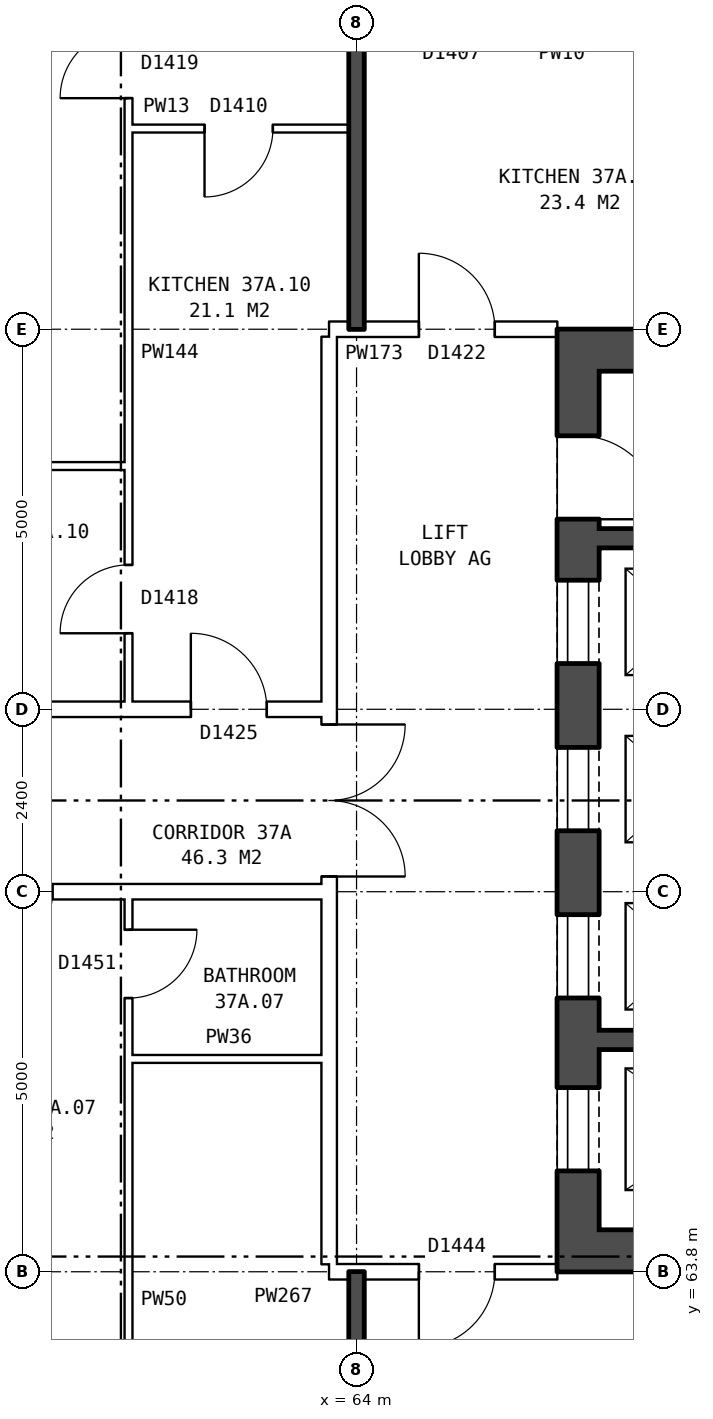
"""IFC4 building model, lengths in metres.
Left out: names, types, materials, properties, quantities, classifications, styles, units other than length and angle.
Written with IfcOpenShell. Run it as: python <this file> out.ifc"""

import sys

from ifc_helpers import new_model, si_unit, direction, frame, frame_2d, origin, place, context, subcontext, project, spatial, rectangle, extrude, element, fill, save


model = new_model("IFC4")
c1 = context("Model", 3, precision=1e-05, world=origin(), true_north=direction((0.0, 1.0)))
c2 = subcontext(c1, "Body", "Model", "MODEL_VIEW")
j1 = project(units=[si_unit("LENGTHUNIT", "METRE"), si_unit("PLANEANGLEUNIT", "RADIAN")], contexts=[c1])
p1 = place(None, origin())
s1 = spatial("IfcSite", under=j1, at=p1, CompositionType="ELEMENT")
p2 = place(p1, origin())
s2 = spatial("IfcBuilding", under=s1, at=p2, CompositionType="ELEMENT")
p3 = place(p2, frame((0.0, 0.0, 133.0)))
s3 = spatial("IfcBuildingStorey", under=s2, at=p3, CompositionType="ELEMENT", Elevation=133.0)
p4 = place(p3, frame((66.915, 63.8, 0.0), z_axis=(0.0, 0.0, 1.0), x_axis=(0.0, 1.0, 0.0)))
e1 = element("IfcWall", 1, at=p4, inside=s3, PredefinedType="SHEAR", context=c2, shape_type="SweptSolid", body=[
    extrude(rectangle(XDim=12.4, YDim=0.55, at=frame_2d((6.2, 0.0))), origin(), (0.0, 0.0, 1.0), 2.85),
])
p5 = place(p4, frame((1.325, 0.0, 0.0)))
e2 = element("IfcOpeningElement", 2, at=p5, cuts=e1, PredefinedType="OPENING", context=c2, shape_type="SweptSolid", body=[
    extrude(rectangle(XDim=1.1, YDim=2.1, at=frame_2d((0.55, 1.05))), frame((0.0, 0.285, 0.0), z_axis=(0.0, -1.0, 0.0), x_axis=(1.0, 0.0, 0.0)), (0.0, 0.0, 1.0), 0.57),
])
p6 = place(p4, frame((3.6, 0.0, 0.0)))
e3 = element("IfcOpeningElement", 3, at=p6, cuts=e1, PredefinedType="OPENING", context=c2, shape_type="SweptSolid", body=[
    extrude(rectangle(XDim=1.1, YDim=2.1, at=frame_2d((0.55, 1.05))), frame((0.0, 0.285, 0.0), z_axis=(0.0, -1.0, 0.0), x_axis=(1.0, 0.0, 0.0)), (0.0, 0.0, 1.0), 0.57),
])
p7 = place(p4, frame((5.8, 0.0, 0.0)))
e4 = element("IfcOpeningElement", 4, at=p7, cuts=e1, PredefinedType="OPENING", context=c2, shape_type="SweptSolid", body=[
    extrude(rectangle(XDim=1.1, YDim=2.1, at=frame_2d((0.55, 1.05))), frame((0.0, 0.285, 0.0), z_axis=(0.0, -1.0, 0.0), x_axis=(1.0, 0.0, 0.0)), (0.0, 0.0, 1.0), 0.57),
])
p8 = place(p4, frame((8.0, 0.0, 0.0)))
e5 = element("IfcOpeningElement", 5, at=p8, cuts=e1, PredefinedType="OPENING", context=c2, shape_type="SweptSolid", body=[
    extrude(rectangle(XDim=1.1, YDim=2.1, at=frame_2d((0.55, 1.05))), frame((0.0, 0.285, 0.0), z_axis=(0.0, -1.0, 0.0), x_axis=(1.0, 0.0, 0.0)), (0.0, 0.0, 1.0), 0.57),
])
p9 = place(p4, frame((9.9, 0.0, 0.0)))
e6 = element("IfcOpeningElement", 6, at=p9, cuts=e1, PredefinedType="OPENING", context=c2, shape_type="SweptSolid", body=[
    extrude(rectangle(XDim=1.1, YDim=2.1, at=frame_2d((0.55, 1.05))), frame((0.0, 0.285, 0.0), z_axis=(0.0, -1.0, 0.0), x_axis=(1.0, 0.0, 0.0)), (0.0, 0.0, 1.0), 0.57),
])
for number, where, z_axis, x_axis in (
    (7, (67.19, 64.075, 0.0), (0.0, 0.0, 1.0), (1.0, 0.0, 0.0)),
    (8, (67.19, 75.925, 0.0), (0.0, 0.0, 1.0), (1.0, 0.0, 0.0)),
):
    element("IfcWall", number, at=place(p3, frame(where, z_axis=z_axis, x_axis=x_axis)), inside=s3, PredefinedType="SHEAR", context=c2, shape_type="SweptSolid", body=[
        extrude(rectangle(XDim=7.9, YDim=0.55, at=frame_2d((3.95, 0.0))), origin(), (0.0, 0.0, 1.0), 2.85),
    ])
p10 = place(p3, frame((67.19, 66.85, 0.0), z_axis=(0.0, 0.0, 1.0), x_axis=(1.0, 0.0, 0.0)))
e9 = element("IfcWall", 9, at=p10, inside=s3, PredefinedType="SHEAR", context=c2, shape_type="SweptSolid", body=[
    extrude(rectangle(XDim=3.445, YDim=0.25, at=frame_2d((1.723, 0.0))), origin(), (0.0, 0.0, 1.0), 2.85),
])
p11 = place(p3, frame((67.19, 73.45, 0.0), z_axis=(0.0, 0.0, 1.0), x_axis=(1.0, 0.0, 0.0)))
e10 = element("IfcWall", 10, at=p11, inside=s3, PredefinedType="SHEAR", context=c2, shape_type="SweptSolid", body=[
    extrude(rectangle(XDim=2.375, YDim=0.25, at=frame_2d((1.188, 0.0))), origin(), (0.0, 0.0, 1.0), 2.85),
])
p12 = place(p3, frame((63.64, 63.9, 0.0), z_axis=(0.0, 0.0, 1.0), x_axis=(0.0, 1.0, 0.0)))
e11 = element("IfcWall", 11, at=p12, inside=s3, PredefinedType="PARTITIONING", context=c2, shape_type="SweptSolid", body=[
    extrude(rectangle(XDim=12.2, YDim=0.2, at=frame_2d((6.1, 0.0))), origin(), (0.0, 0.0, 1.0), 2.85),
])
p13 = place(p12, frame((5.1, 0.0, 0.0)))
e12 = element("IfcOpeningElement", 12, at=p13, cuts=e11, PredefinedType="OPENING", context=c2, shape_type="SweptSolid", body=[
    extrude(rectangle(XDim=2.0, YDim=2.1, at=frame_2d((1.0, 1.05))), frame((0.0, 0.11, 0.0), z_axis=(0.0, -1.0, 0.0), x_axis=(1.0, 0.0, 0.0)), (0.0, 0.0, 1.0), 0.22),
])
p14 = place(p3, frame((63.64, 63.8, 0.0), z_axis=(0.0, 0.0, 1.0), x_axis=(1.0, 0.0, 0.0)))
e13 = element("IfcWall", 13, at=p14, inside=s3, PredefinedType="PARTITIONING", context=c2, shape_type="SweptSolid", body=[
    extrude(rectangle(XDim=3.0, YDim=0.2, at=frame_2d((1.5, 0.0))), origin(), (0.0, 0.0, 1.0), 2.85),
])
p15 = place(p14, frame((1.18, 0.0, 0.0)))
e14 = element("IfcOpeningElement", 14, at=p15, cuts=e13, PredefinedType="OPENING", context=c2, shape_type="SweptSolid", body=[
    extrude(rectangle(XDim=1.0, YDim=2.1, at=frame_2d((0.5, 1.05))), frame((0.0, 0.11, 0.0), z_axis=(0.0, -1.0, 0.0), x_axis=(1.0, 0.0, 0.0)), (0.0, 0.0, 1.0), 0.22),
])
p16 = place(p3, frame((61.0, 66.6, 0.0), z_axis=(0.0, 0.0, 1.0), x_axis=(1.0, 0.0, 0.0)))
e15 = element("IfcWall", 15, at=p16, inside=s3, PredefinedType="PARTITIONING", context=c2, shape_type="SweptSolid", body=[
    extrude(rectangle(XDim=2.64, YDim=0.1, at=frame_2d((1.32, 0.0))), origin(), (0.0, 0.0, 1.0), 2.85),
])
p17 = place(p3, frame((44.36, 68.8, 0.0), z_axis=(0.0, 0.0, 1.0), x_axis=(1.0, 0.0, 0.0)))
e16 = element("IfcWall", 16, at=p17, inside=s3, PredefinedType="PARTITIONING", context=c2, shape_type="SweptSolid", body=[
    extrude(rectangle(XDim=19.28, YDim=0.2, at=frame_2d((9.64, 0.0))), origin(), (0.0, 0.0, 1.0), 2.85),
])
p18 = place(p17, frame((14.64, 0.0, 0.0)))
e17 = element("IfcOpeningElement", 17, at=p18, cuts=e16, PredefinedType="OPENING", context=c2, shape_type="SweptSolid", body=[
    extrude(rectangle(XDim=1.0, YDim=2.1, at=frame_2d((0.5, 1.05))), frame((0.0, 0.11, 0.0), z_axis=(0.0, -1.0, 0.0), x_axis=(1.0, 0.0, 0.0)), (0.0, 0.0, 1.0), 0.22),
])
p19 = place(p17, frame((8.64, 0.0, 0.0)))
e18 = element("IfcOpeningElement", 18, at=p19, cuts=e16, PredefinedType="OPENING", context=c2, shape_type="SweptSolid", body=[
    extrude(rectangle(XDim=1.0, YDim=2.1, at=frame_2d((0.5, 1.05))), frame((0.0, 0.11, 0.0), z_axis=(0.0, -1.0, 0.0), x_axis=(1.0, 0.0, 0.0)), (0.0, 0.0, 1.0), 0.22),
])
p20 = place(p17, frame((2.64, 0.0, 0.0)))
e19 = element("IfcOpeningElement", 19, at=p20, cuts=e16, PredefinedType="OPENING", context=c2, shape_type="SweptSolid", body=[
    extrude(rectangle(XDim=1.0, YDim=2.1, at=frame_2d((0.5, 1.05))), frame((0.0, 0.11, 0.0), z_axis=(0.0, -1.0, 0.0), x_axis=(1.0, 0.0, 0.0)), (0.0, 0.0, 1.0), 0.22),
])
p21 = place(p3, frame((44.36, 71.2, 0.0), z_axis=(0.0, 0.0, 1.0), x_axis=(1.0, 0.0, 0.0)))
e20 = element("IfcWall", 20, at=p21, inside=s3, PredefinedType="PARTITIONING", context=c2, shape_type="SweptSolid", body=[
    extrude(rectangle(XDim=19.28, YDim=0.2, at=frame_2d((9.64, 0.0))), origin(), (0.0, 0.0, 1.0), 2.85),
])
p22 = place(p21, frame((17.46, 0.0, 0.0)))
e21 = element("IfcOpeningElement", 21, at=p22, cuts=e20, PredefinedType="OPENING", context=c2, shape_type="SweptSolid", body=[
    extrude(rectangle(XDim=1.0, YDim=2.1, at=frame_2d((0.5, 1.05))), frame((0.0, 0.11, 0.0), z_axis=(0.0, -1.0, 0.0), x_axis=(1.0, 0.0, 0.0)), (0.0, 0.0, 1.0), 0.22),
])
p23 = place(p21, frame((8.64, 0.0, 0.0)))
e22 = element("IfcOpeningElement", 22, at=p23, cuts=e20, PredefinedType="OPENING", context=c2, shape_type="SweptSolid", body=[
    extrude(rectangle(XDim=1.0, YDim=2.1, at=frame_2d((0.5, 1.05))), frame((0.0, 0.11, 0.0), z_axis=(0.0, -1.0, 0.0), x_axis=(1.0, 0.0, 0.0)), (0.0, 0.0, 1.0), 0.22),
])
p24 = place(p21, frame((2.64, 0.0, 0.0)))
e23 = element("IfcOpeningElement", 23, at=p24, cuts=e20, PredefinedType="OPENING", context=c2, shape_type="SweptSolid", body=[
    extrude(rectangle(XDim=1.0, YDim=2.1, at=frame_2d((0.5, 1.05))), frame((0.0, 0.11, 0.0), z_axis=(0.0, -1.0, 0.0), x_axis=(1.0, 0.0, 0.0)), (0.0, 0.0, 1.0), 0.22),
])
p25 = place(p3, frame((58.1, 74.4, 0.0), z_axis=(0.0, 0.0, 1.0), x_axis=(1.0, 0.0, 0.0)))
e24 = element("IfcWall", 24, at=p25, inside=s3, PredefinedType="PARTITIONING", context=c2, shape_type="SweptSolid", body=[
    extrude(rectangle(XDim=2.9, YDim=0.1, at=frame_2d((1.45, 0.0))), origin(), (0.0, 0.0, 1.0), 2.85),
])
p26 = place(p3, frame((63.64, 76.2, 0.0), z_axis=(0.0, 0.0, 1.0), x_axis=(1.0, 0.0, 0.0)))
e25 = element("IfcWall", 25, at=p26, inside=s3, PredefinedType="PARTITIONING", context=c2, shape_type="SweptSolid", body=[
    extrude(rectangle(XDim=3.0, YDim=0.2, at=frame_2d((1.5, 0.0))), origin(), (0.0, 0.0, 1.0), 2.85),
])
p27 = place(p26, frame((1.18, 0.0, 0.0)))
e26 = element("IfcOpeningElement", 26, at=p27, cuts=e25, PredefinedType="OPENING", context=c2, shape_type="SweptSolid", body=[
    extrude(rectangle(XDim=1.0, YDim=2.1, at=frame_2d((0.5, 1.05))), frame((0.0, 0.11, 0.0), z_axis=(0.0, -1.0, 0.0), x_axis=(1.0, 0.0, 0.0)), (0.0, 0.0, 1.0), 0.22),
])
p28 = place(p3, frame((61.0, 78.84, 0.0), z_axis=(0.0, 0.0, 1.0), x_axis=(1.0, 0.0, 0.0)))
e27 = element("IfcWall", 27, at=p28, inside=s3, PredefinedType="PARTITIONING", context=c2, shape_type="SweptSolid", body=[
    extrude(rectangle(XDim=2.9, YDim=0.1, at=frame_2d((1.45, 0.0))), origin(), (0.0, 0.0, 1.0), 2.85),
])
p29 = place(p28, frame((1.0, 0.0, 0.0)))
e28 = element("IfcOpeningElement", 28, at=p29, cuts=e27, PredefinedType="OPENING", context=c2, shape_type="SweptSolid", body=[
    extrude(rectangle(XDim=0.9, YDim=2.1, at=frame_2d((0.45, 1.05))), frame((0.0, 0.06, 0.0), z_axis=(0.0, -1.0, 0.0), x_axis=(1.0, 0.0, 0.0)), (0.0, 0.0, 1.0), 0.12),
])
p30 = place(p3, frame((61.0, 54.36, 0.0), z_axis=(0.0, 0.0, 1.0), x_axis=(0.0, 1.0, 0.0)))
e29 = element("IfcWall", 29, at=p30, inside=s3, PredefinedType="PARTITIONING", context=c2, shape_type="SweptSolid", body=[
    extrude(rectangle(XDim=14.34, YDim=0.1, at=frame_2d((7.17, 0.0))), origin(), (0.0, 0.0, 1.0), 2.85),
])
p31 = place(p30, frame((4.2, 0.0, 0.0)))
e30 = element("IfcOpeningElement", 30, at=p31, cuts=e29, PredefinedType="OPENING", context=c2, shape_type="SweptSolid", body=[
    extrude(rectangle(XDim=0.9, YDim=2.1, at=frame_2d((0.45, 1.05))), frame((0.0, 0.06, 0.0), z_axis=(0.0, -1.0, 0.0), x_axis=(1.0, 0.0, 0.0)), (0.0, 0.0, 1.0), 0.12),
])
p32 = place(p30, frame((13.04, 0.0, 0.0)))
e31 = element("IfcOpeningElement", 31, at=p32, cuts=e29, PredefinedType="OPENING", context=c2, shape_type="SweptSolid", body=[
    extrude(rectangle(XDim=0.9, YDim=2.1, at=frame_2d((0.45, 1.05))), frame((0.0, 0.06, 0.0), z_axis=(0.0, -1.0, 0.0), x_axis=(1.0, 0.0, 0.0)), (0.0, 0.0, 1.0), 0.12),
])
p33 = place(p3, frame((61.0, 71.3, 0.0), z_axis=(0.0, 0.0, 1.0), x_axis=(0.0, 1.0, 0.0)))
e32 = element("IfcWall", 32, at=p33, inside=s3, PredefinedType="PARTITIONING", context=c2, shape_type="SweptSolid", body=[
    extrude(rectangle(XDim=14.34, YDim=0.1, at=frame_2d((7.17, 0.0))), origin(), (0.0, 0.0, 1.0), 2.85),
])
p34 = place(p33, frame((7.94, 0.0, 0.0)))
e33 = element("IfcOpeningElement", 33, at=p34, cuts=e32, PredefinedType="OPENING", context=c2, shape_type="SweptSolid", body=[
    extrude(rectangle(XDim=0.9, YDim=2.1, at=frame_2d((0.45, 1.05))), frame((0.0, 0.06, 0.0), z_axis=(0.0, -1.0, 0.0), x_axis=(1.0, 0.0, 0.0)), (0.0, 0.0, 1.0), 0.12),
])
p35 = place(p33, frame((0.9, 0.0, 0.0)))
e34 = element("IfcOpeningElement", 34, at=p35, cuts=e32, PredefinedType="OPENING", context=c2, shape_type="SweptSolid", body=[
    extrude(rectangle(XDim=0.9, YDim=2.1, at=frame_2d((0.45, 1.05))), frame((0.0, 0.06, 0.0), z_axis=(0.0, -1.0, 0.0), x_axis=(1.0, 0.0, 0.0)), (0.0, 0.0, 1.0), 0.12),
])
for number, where, z_axis, x_axis in (
    (35, (64.0, 54.36, 0.0), (0.0, 0.0, 1.0), (0.0, 1.0, 0.0)),
    (36, (64.0, 76.2, 0.0), (0.0, 0.0, 1.0), (0.0, 1.0, 0.0)),
):
    element("IfcWall", number, at=place(p3, frame(where, z_axis=z_axis, x_axis=x_axis)), inside=s3, PredefinedType="SOLIDWALL", context=c2, shape_type="SweptSolid", body=[
        extrude(rectangle(XDim=9.44, YDim=0.2, at=frame_2d((4.72, 0.0))), origin(), (0.0, 0.0, 1.0), 2.85),
    ])
p36 = place(p5, origin())
e37 = element("IfcDoor", 37, at=p36, inside=s3, OperationType="DOUBLE_DOOR_SLIDING", PredefinedType="DOOR", context=c2, shape_type="SweptSolid", body=[
    extrude(rectangle(XDim=1.1, YDim=2.1, at=frame_2d((0.55, 1.05))), frame((0.0, -0.21, 0.0), z_axis=(0.0, -1.0, 0.0), x_axis=(1.0, 0.0, 0.0)), (0.0, 0.0, 1.0), 0.05),
])
fill(e2, e37)
p37 = place(p6, origin())
e38 = element("IfcDoor", 38, at=p37, inside=s3, OperationType="DOUBLE_DOOR_SLIDING", PredefinedType="DOOR", context=c2, shape_type="SweptSolid", body=[
    extrude(rectangle(XDim=1.1, YDim=2.1, at=frame_2d((0.55, 1.05))), frame((0.0, -0.21, 0.0), z_axis=(0.0, -1.0, 0.0), x_axis=(1.0, 0.0, 0.0)), (0.0, 0.0, 1.0), 0.05),
])
fill(e3, e38)
p38 = place(p7, origin())
e39 = element("IfcDoor", 39, at=p38, inside=s3, OperationType="DOUBLE_DOOR_SLIDING", PredefinedType="DOOR", context=c2, shape_type="SweptSolid", body=[
    extrude(rectangle(XDim=1.1, YDim=2.1, at=frame_2d((0.55, 1.05))), frame((0.0, -0.21, 0.0), z_axis=(0.0, -1.0, 0.0), x_axis=(1.0, 0.0, 0.0)), (0.0, 0.0, 1.0), 0.05),
])
fill(e4, e39)
p39 = place(p8, origin())
e40 = element("IfcDoor", 40, at=p39, inside=s3, OperationType="DOUBLE_DOOR_SLIDING", PredefinedType="DOOR", context=c2, shape_type="SweptSolid", body=[
    extrude(rectangle(XDim=1.1, YDim=2.1, at=frame_2d((0.55, 1.05))), frame((0.0, -0.21, 0.0), z_axis=(0.0, -1.0, 0.0), x_axis=(1.0, 0.0, 0.0)), (0.0, 0.0, 1.0), 0.05),
])
fill(e5, e40)
p40 = place(p9, frame((1.1, 0.0, 0.0), z_axis=(0.0, 0.0, 1.0), x_axis=(-1.0, 0.0, 0.0)))
e41 = element("IfcDoor", 41, at=p40, inside=s3, OperationType="SINGLE_SWING_RIGHT", PredefinedType="DOOR", context=c2, shape_type="SweptSolid", body=[
    extrude(rectangle(XDim=1.1, YDim=2.1, at=frame_2d((0.55, 1.05))), frame((0.0, 0.26, 0.0), z_axis=(0.0, -1.0, 0.0), x_axis=(1.0, 0.0, 0.0)), (0.0, 0.0, 1.0), 0.05),
])
fill(e6, e41)
p41 = place(p13, frame((2.0, 0.0, 0.0), z_axis=(0.0, 0.0, 1.0), x_axis=(-1.0, 0.0, 0.0)))
e42 = element("IfcDoor", 42, at=p41, inside=s3, OperationType="DOUBLE_DOOR_SINGLE_SWING", PredefinedType="DOOR", context=c2, shape_type="SweptSolid", body=[
    extrude(rectangle(XDim=2.0, YDim=2.1, at=frame_2d((1.0, 1.05))), frame((0.0, 0.025, 0.0), z_axis=(0.0, -1.0, 0.0), x_axis=(1.0, 0.0, 0.0)), (0.0, 0.0, 1.0), 0.05),
])
fill(e12, e42)
p42 = place(p15, frame((1.0, 0.0, 0.0), z_axis=(0.0, 0.0, 1.0), x_axis=(-1.0, 0.0, 0.0)))
e43 = element("IfcDoor", 43, at=p42, inside=s3, OperationType="SINGLE_SWING_RIGHT", PredefinedType="DOOR", context=c2, shape_type="SweptSolid", body=[
    extrude(rectangle(XDim=1.0, YDim=2.1, at=frame_2d((0.5, 1.05))), frame((0.0, 0.025, 0.0), z_axis=(0.0, -1.0, 0.0), x_axis=(1.0, 0.0, 0.0)), (0.0, 0.0, 1.0), 0.05),
])
fill(e14, e43)
p43 = place(p27, origin())
e44 = element("IfcDoor", 44, at=p43, inside=s3, OperationType="SINGLE_SWING_LEFT", PredefinedType="DOOR", context=c2, shape_type="SweptSolid", body=[
    extrude(rectangle(XDim=1.0, YDim=2.1, at=frame_2d((0.5, 1.05))), frame((0.0, 0.025, 0.0), z_axis=(0.0, -1.0, 0.0), x_axis=(1.0, 0.0, 0.0)), (0.0, 0.0, 1.0), 0.05),
])
fill(e26, e44)
p44 = place(p32, frame((0.9, 0.0, 0.0), z_axis=(0.0, 0.0, 1.0), x_axis=(-1.0, 0.0, 0.0)))
e45 = element("IfcDoor", 45, at=p44, inside=s3, OperationType="SINGLE_SWING_LEFT", PredefinedType="DOOR", context=c2, shape_type="SweptSolid", body=[
    extrude(rectangle(XDim=0.9, YDim=2.1, at=frame_2d((0.45, 1.05))), frame((0.0, 0.025, 0.0), z_axis=(0.0, -1.0, 0.0), x_axis=(1.0, 0.0, 0.0)), (0.0, 0.0, 1.0), 0.05),
])
fill(e31, e45)
p45 = place(p34, origin())
e46 = element("IfcDoor", 46, at=p45, inside=s3, OperationType="SINGLE_SWING_LEFT", PredefinedType="DOOR", context=c2, shape_type="SweptSolid", body=[
    extrude(rectangle(XDim=0.9, YDim=2.1, at=frame_2d((0.45, 1.05))), frame((0.0, 0.025, 0.0), z_axis=(0.0, -1.0, 0.0), x_axis=(1.0, 0.0, 0.0)), (0.0, 0.0, 1.0), 0.05),
])
fill(e33, e46)
p46 = place(p22, origin())
e47 = element("IfcDoor", 47, at=p46, inside=s3, OperationType="SINGLE_SWING_LEFT", PredefinedType="DOOR", context=c2, shape_type="SweptSolid", body=[
    extrude(rectangle(XDim=1.0, YDim=2.1, at=frame_2d((0.5, 1.05))), frame((0.0, 0.025, 0.0), z_axis=(0.0, -1.0, 0.0), x_axis=(1.0, 0.0, 0.0)), (0.0, 0.0, 1.0), 0.05),
])
fill(e21, e47)
p47 = place(p29, frame((0.9, 0.0, 0.0), z_axis=(0.0, 0.0, 1.0), x_axis=(-1.0, 0.0, 0.0)))
e48 = element("IfcDoor", 48, at=p47, inside=s3, OperationType="SINGLE_SWING_RIGHT", PredefinedType="DOOR", context=c2, shape_type="SweptSolid", body=[
    extrude(rectangle(XDim=0.9, YDim=2.1, at=frame_2d((0.45, 1.05))), frame((0.0, 0.025, 0.0), z_axis=(0.0, -1.0, 0.0), x_axis=(1.0, 0.0, 0.0)), (0.0, 0.0, 1.0), 0.05),
])
fill(e28, e48)
p48 = place(p35, origin())
e49 = element("IfcDoor", 49, at=p48, inside=s3, OperationType="SINGLE_SWING_LEFT", PredefinedType="DOOR", context=c2, shape_type="SweptSolid", body=[
    extrude(rectangle(XDim=0.9, YDim=2.1, at=frame_2d((0.45, 1.05))), frame((0.0, 0.025, 0.0), z_axis=(0.0, -1.0, 0.0), x_axis=(1.0, 0.0, 0.0)), (0.0, 0.0, 1.0), 0.05),
])
fill(e34, e49)
save(model, sys.argv[1])
